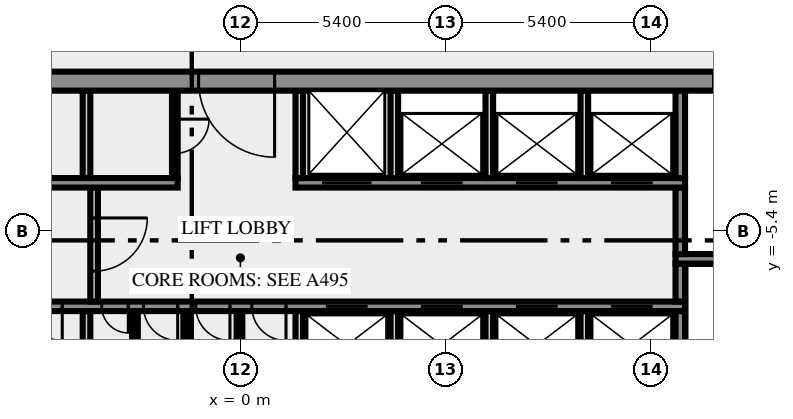
"""IFC4 building model, lengths in metres.
Left out: names, types, materials, properties, quantities, classifications, styles, units other than length and angle.
Written with IfcOpenShell. Run it as: python <this file> out.ifc"""

import sys

from ifc_helpers import new_model, si_unit, direction, frame, frame_2d, origin, place, context, subcontext, project, spatial, rectangle, extrude, element, fill, save


model = new_model("IFC4")
c1 = context("Model", 3, precision=1e-05, world=origin(), true_north=direction((0.0, 1.0)))
c2 = subcontext(c1, "Body", "Model", "MODEL_VIEW")
j1 = project(units=[si_unit("LENGTHUNIT", "METRE"), si_unit("PLANEANGLEUNIT", "RADIAN")], contexts=[c1])
p1 = place(None, origin())
s1 = spatial("IfcSite", under=j1, at=p1, CompositionType="ELEMENT")
p2 = place(p1, origin())
s2 = spatial("IfcBuilding", under=s1, at=p2, CompositionType="ELEMENT")
p3 = place(p2, frame((0.0, 0.0, 214.0)))
s3 = spatial("IfcBuildingStorey", under=s2, at=p3, CompositionType="ELEMENT", Elevation=214.0)
p4 = place(p3, frame((-4.05, -10.5, 0.0), z_axis=(0.0, 0.0, 1.0), x_axis=(0.0, 1.0, 0.0)))
e1 = element("IfcWall", 1, at=p4, inside=s3, PredefinedType="SOLIDWALL", context=c2, shape_type="SweptSolid", body=[
    extrude(rectangle(XDim=3.0, YDim=0.2, at=frame_2d((1.5, 0.0))), origin(), (0.0, 0.0, 1.0), 3.65),
])
for number, where, z_axis, x_axis in (
    (2, (-2.775, -10.5, 0.0), (0.0, 0.0, 1.0), (0.0, 1.0, 0.0)),
    (3, (-1.425, -10.5, 0.0), (0.0, 0.0, 1.0), (0.0, 1.0, 0.0)),
    (4, (-0.025, -10.5, 0.0), (0.0, 0.0, 1.0), (0.0, 1.0, 0.0)),
):
    element("IfcWall", number, at=place(p3, frame(where, z_axis=z_axis, x_axis=x_axis)), inside=s3, PredefinedType="PARTITIONING", context=c2, shape_type="SweptSolid", body=[
        extrude(rectangle(XDim=3.0, YDim=0.15, at=frame_2d((1.5, 0.0))), origin(), (0.0, 0.0, 1.0), 3.65),
    ])
for number, where, z_axis, x_axis in (
    (5, (1.55, -10.5, 0.0), (0.0, 0.0, 1.0), (0.0, 1.0, 0.0)),
    (6, (4.05, -10.5, 0.0), (0.0, 0.0, 1.0), (0.0, 1.0, 0.0)),
    (7, (6.55, -10.5, 0.0), (0.0, 0.0, 1.0), (0.0, 1.0, 0.0)),
    (8, (9.05, -10.5, 0.0), (0.0, 0.0, 1.0), (0.0, 1.0, 0.0)),
):
    element("IfcWall", number, at=place(p3, frame(where, z_axis=z_axis, x_axis=x_axis)), inside=s3, PredefinedType="SOLIDWALL", context=c2, shape_type="SweptSolid", body=[
        extrude(rectangle(XDim=3.0, YDim=0.2, at=frame_2d((1.5, 0.0))), origin(), (0.0, 0.0, 1.0), 3.65),
    ])
p5 = place(p3, frame((11.575, -10.5, 0.0), z_axis=(0.0, 0.0, 1.0), x_axis=(0.0, 1.0, 0.0)))
e9 = element("IfcWall", 9, at=p5, inside=s3, PredefinedType="SHEAR", context=c2, shape_type="SweptSolid", body=[
    extrude(rectangle(XDim=3.0, YDim=0.25, at=frame_2d((1.5, 0.0))), origin(), (0.0, 0.0, 1.0), 3.65),
])
p6 = place(p3, frame((11.7, -7.375, 0.0), z_axis=(0.0, 0.0, 1.0), x_axis=(-1.0, 0.0, 0.0)))
e10 = element("IfcWall", 10, at=p6, inside=s3, PredefinedType="SHEAR", context=c2, shape_type="SweptSolid", body=[
    extrude(rectangle(XDim=23.4, YDim=0.25, at=frame_2d((11.7, 0.0))), origin(), (0.0, 0.0, 1.0), 3.65),
])
p7 = place(p6, frame((21.312, 0.0, 0.0)))
e11 = element("IfcOpeningElement", 11, at=p7, cuts=e10, PredefinedType="OPENING", context=c2, shape_type="SweptSolid", body=[
    extrude(rectangle(XDim=0.9, YDim=2.1, at=frame_2d((0.45, 1.05))), frame((0.0, 0.135, 0.0), z_axis=(0.0, -1.0, 0.0), x_axis=(1.0, 0.0, 0.0)), (0.0, 0.0, 1.0), 0.27),
])
p8 = place(p6, frame((18.65, 0.0, 0.0)))
e12 = element("IfcOpeningElement", 12, at=p8, cuts=e10, PredefinedType="OPENING", context=c2, shape_type="SweptSolid", body=[
    extrude(rectangle(XDim=0.9, YDim=2.1, at=frame_2d((0.45, 1.05))), frame((0.0, 0.135, 0.0), z_axis=(0.0, -1.0, 0.0), x_axis=(1.0, 0.0, 0.0)), (0.0, 0.0, 1.0), 0.27),
])
p9 = place(p6, frame((16.388, 0.0, 0.0)))
e13 = element("IfcOpeningElement", 13, at=p9, cuts=e10, PredefinedType="OPENING", context=c2, shape_type="SweptSolid", body=[
    extrude(rectangle(XDim=0.9, YDim=2.1, at=frame_2d((0.45, 1.05))), frame((0.0, 0.135, 0.0), z_axis=(0.0, -1.0, 0.0), x_axis=(1.0, 0.0, 0.0)), (0.0, 0.0, 1.0), 0.27),
])
p10 = place(p6, frame((14.65, 0.0, 0.0)))
e14 = element("IfcOpeningElement", 14, at=p10, cuts=e10, PredefinedType="OPENING", context=c2, shape_type="SweptSolid", body=[
    extrude(rectangle(XDim=0.7, YDim=2.1, at=frame_2d((0.35, 1.05))), frame((0.0, 0.135, 0.0), z_axis=(0.0, -1.0, 0.0), x_axis=(1.0, 0.0, 0.0)), (0.0, 0.0, 1.0), 0.27),
])
p11 = place(p6, frame((13.35, 0.0, 0.0)))
e15 = element("IfcOpeningElement", 15, at=p11, cuts=e10, PredefinedType="OPENING", context=c2, shape_type="SweptSolid", body=[
    extrude(rectangle(XDim=0.9, YDim=2.1, at=frame_2d((0.45, 1.05))), frame((0.0, 0.135, 0.0), z_axis=(0.0, -1.0, 0.0), x_axis=(1.0, 0.0, 0.0)), (0.0, 0.0, 1.0), 0.27),
])
p12 = place(p6, frame((11.975, 0.0, 0.0)))
e16 = element("IfcOpeningElement", 16, at=p12, cuts=e10, PredefinedType="OPENING", context=c2, shape_type="SweptSolid", body=[
    extrude(rectangle(XDim=0.9, YDim=2.1, at=frame_2d((0.45, 1.05))), frame((0.0, 0.135, 0.0), z_axis=(0.0, -1.0, 0.0), x_axis=(1.0, 0.0, 0.0)), (0.0, 0.0, 1.0), 0.27),
])
p13 = place(p6, frame((10.5, 0.0, 0.0)))
e17 = element("IfcOpeningElement", 17, at=p13, cuts=e10, PredefinedType="OPENING", context=c2, shape_type="SweptSolid", body=[
    extrude(rectangle(XDim=0.9, YDim=2.1, at=frame_2d((0.45, 1.05))), frame((0.0, 0.135, 0.0), z_axis=(0.0, -1.0, 0.0), x_axis=(1.0, 0.0, 0.0)), (0.0, 0.0, 1.0), 0.27),
])
p14 = place(p6, frame((8.35, 0.0, 0.0)))
e18 = element("IfcOpeningElement", 18, at=p14, cuts=e10, PredefinedType="OPENING", context=c2, shape_type="SweptSolid", body=[
    extrude(rectangle(XDim=1.1, YDim=2.1, at=frame_2d((0.55, 1.05))), frame((0.0, 0.135, 0.0), z_axis=(0.0, -1.0, 0.0), x_axis=(1.0, 0.0, 0.0)), (0.0, 0.0, 1.0), 0.27),
])
p15 = place(p6, frame((5.85, 0.0, 0.0)))
e19 = element("IfcOpeningElement", 19, at=p15, cuts=e10, PredefinedType="OPENING", context=c2, shape_type="SweptSolid", body=[
    extrude(rectangle(XDim=1.1, YDim=2.1, at=frame_2d((0.55, 1.05))), frame((0.0, 0.135, 0.0), z_axis=(0.0, -1.0, 0.0), x_axis=(1.0, 0.0, 0.0)), (0.0, 0.0, 1.0), 0.27),
])
p16 = place(p6, frame((3.35, 0.0, 0.0)))
e20 = element("IfcOpeningElement", 20, at=p16, cuts=e10, PredefinedType="OPENING", context=c2, shape_type="SweptSolid", body=[
    extrude(rectangle(XDim=1.1, YDim=2.1, at=frame_2d((0.55, 1.05))), frame((0.0, 0.135, 0.0), z_axis=(0.0, -1.0, 0.0), x_axis=(1.0, 0.0, 0.0)), (0.0, 0.0, 1.0), 0.27),
])
p17 = place(p6, frame((0.85, 0.0, 0.0)))
e21 = element("IfcOpeningElement", 21, at=p17, cuts=e10, PredefinedType="OPENING", context=c2, shape_type="SweptSolid", body=[
    extrude(rectangle(XDim=1.1, YDim=2.1, at=frame_2d((0.55, 1.05))), frame((0.0, 0.135, 0.0), z_axis=(0.0, -1.0, 0.0), x_axis=(1.0, 0.0, 0.0)), (0.0, 0.0, 1.0), 0.27),
])
p18 = place(p3, frame((-3.85, -4.25, 0.0), z_axis=(0.0, 0.0, 1.0), x_axis=(0.0, -1.0, 0.0)))
e22 = element("IfcWall", 22, at=p18, inside=s3, PredefinedType="SOLIDWALL", context=c2, shape_type="SweptSolid", body=[
    extrude(rectangle(XDim=3.0, YDim=0.2, at=frame_2d((1.5, 0.0))), origin(), (0.0, 0.0, 1.0), 3.65),
])
p19 = place(p18, frame((0.8, 0.0, 0.0)))
e23 = element("IfcOpeningElement", 23, at=p19, cuts=e22, PredefinedType="OPENING", context=c2, shape_type="SweptSolid", body=[
    extrude(rectangle(XDim=1.4, YDim=2.1, at=frame_2d((0.7, 1.05))), frame((0.0, 0.11, 0.0), z_axis=(0.0, -1.0, 0.0), x_axis=(1.0, 0.0, 0.0)), (0.0, 0.0, 1.0), 0.22),
])
p20 = place(p3, frame((11.575, -7.25, 0.0), z_axis=(0.0, 0.0, 1.0), x_axis=(0.0, 1.0, 0.0)))
e24 = element("IfcWall", 24, at=p20, inside=s3, PredefinedType="SHEAR", context=c2, shape_type="SweptSolid", body=[
    extrude(rectangle(XDim=1.0, YDim=0.25, at=frame_2d((0.5, 0.0))), origin(), (0.0, 0.0, 1.0), 3.65),
])
p21 = place(p3, frame((19.5, -6.125, 0.0), z_axis=(0.0, 0.0, 1.0), x_axis=(-1.0, 0.0, 0.0)))
e25 = element("IfcWall", 25, at=p21, inside=s3, PredefinedType="SHEAR", context=c2, shape_type="SweptSolid", body=[
    extrude(rectangle(XDim=8.05, YDim=0.25, at=frame_2d((4.025, 0.0))), origin(), (0.0, 0.0, 1.0), 3.65),
])
p22 = place(p21, frame((0.05, 0.0, 0.0)))
e26 = element("IfcOpeningElement", 26, at=p22, cuts=e25, PredefinedType="OPENING", context=c2, shape_type="SweptSolid", body=[
    extrude(rectangle(XDim=1.8, YDim=2.1, at=frame_2d((0.9, 1.05))), frame((0.0, 0.135, 0.0), z_axis=(0.0, -1.0, 0.0), x_axis=(1.0, 0.0, 0.0)), (0.0, 0.0, 1.0), 0.27),
])
p23 = place(p3, frame((11.575, -6.0, 0.0), z_axis=(0.0, 0.0, 1.0), x_axis=(0.0, 1.0, 0.0)))
e27 = element("IfcWall", 27, at=p23, inside=s3, PredefinedType="SHEAR", context=c2, shape_type="SweptSolid", body=[
    extrude(rectangle(XDim=1.75, YDim=0.25, at=frame_2d((0.875, 0.0))), origin(), (0.0, 0.0, 1.0), 3.65),
])
p24 = place(p3, frame((-11.7, -4.125, 0.0), z_axis=(0.0, 0.0, 1.0), x_axis=(1.0, 0.0, 0.0)))
e28 = element("IfcWall", 28, at=p24, inside=s3, PredefinedType="SHEAR", context=c2, shape_type="SweptSolid", body=[
    extrude(rectangle(XDim=10.05, YDim=0.25, at=frame_2d((5.025, 0.0))), origin(), (0.0, 0.0, 1.0), 3.65),
])
p25 = place(p3, frame((1.45, -4.125, 0.0), z_axis=(0.0, 0.0, 1.0), x_axis=(1.0, 0.0, 0.0)))
e29 = element("IfcWall", 29, at=p25, inside=s3, PredefinedType="SHEAR", context=c2, shape_type="SweptSolid", body=[
    extrude(rectangle(XDim=10.25, YDim=0.25, at=frame_2d((5.125, 0.0))), origin(), (0.0, 0.0, 1.0), 3.65),
])
p26 = place(p25, frame((0.7, 0.0, 0.0)))
e30 = element("IfcOpeningElement", 30, at=p26, cuts=e29, PredefinedType="OPENING", context=c2, shape_type="SweptSolid", body=[
    extrude(rectangle(XDim=1.3, YDim=2.1, at=frame_2d((0.65, 1.05))), frame((0.0, 0.135, 0.0), z_axis=(0.0, -1.0, 0.0), x_axis=(1.0, 0.0, 0.0)), (0.0, 0.0, 1.0), 0.27),
])
p27 = place(p25, frame((3.3, 0.0, 0.0)))
e31 = element("IfcOpeningElement", 31, at=p27, cuts=e29, PredefinedType="OPENING", context=c2, shape_type="SweptSolid", body=[
    extrude(rectangle(XDim=1.1, YDim=2.1, at=frame_2d((0.55, 1.05))), frame((0.0, 0.135, 0.0), z_axis=(0.0, -1.0, 0.0), x_axis=(1.0, 0.0, 0.0)), (0.0, 0.0, 1.0), 0.27),
])
p28 = place(p25, frame((5.8, 0.0, 0.0)))
e32 = element("IfcOpeningElement", 32, at=p28, cuts=e29, PredefinedType="OPENING", context=c2, shape_type="SweptSolid", body=[
    extrude(rectangle(XDim=1.1, YDim=2.1, at=frame_2d((0.55, 1.05))), frame((0.0, 0.135, 0.0), z_axis=(0.0, -1.0, 0.0), x_axis=(1.0, 0.0, 0.0)), (0.0, 0.0, 1.0), 0.27),
])
p29 = place(p25, frame((8.3, 0.0, 0.0)))
e33 = element("IfcOpeningElement", 33, at=p29, cuts=e29, PredefinedType="OPENING", context=c2, shape_type="SweptSolid", body=[
    extrude(rectangle(XDim=1.1, YDim=2.1, at=frame_2d((0.55, 1.05))), frame((0.0, 0.135, 0.0), z_axis=(0.0, -1.0, 0.0), x_axis=(1.0, 0.0, 0.0)), (0.0, 0.0, 1.0), 0.27),
])
p30 = place(p3, frame((-4.05, -4.0, 0.0), z_axis=(0.0, 0.0, 1.0), x_axis=(0.0, 1.0, 0.0)))
e34 = element("IfcWall", 34, at=p30, inside=s3, PredefinedType="SOLIDWALL", context=c2, shape_type="SweptSolid", body=[
    extrude(rectangle(XDim=2.3, YDim=0.2, at=frame_2d((1.15, 0.0))), origin(), (0.0, 0.0, 1.0), 3.65),
])
p31 = place(p3, frame((-1.725, -1.7, 0.0), z_axis=(0.0, 0.0, 1.0), x_axis=(0.0, -1.0, 0.0)))
e35 = element("IfcWall", 35, at=p31, inside=s3, PredefinedType="PARTITIONING", context=c2, shape_type="SweptSolid", body=[
    extrude(rectangle(XDim=2.3, YDim=0.15, at=frame_2d((1.15, 0.0))), origin(), (0.0, 0.0, 1.0), 3.65),
])
p32 = place(p31, frame((0.75, 0.0, 0.0)))
e36 = element("IfcOpeningElement", 36, at=p32, cuts=e35, PredefinedType="OPENING", context=c2, shape_type="SweptSolid", body=[
    extrude(rectangle(XDim=0.9, YDim=2.1, at=frame_2d((0.45, 1.05))), frame((0.0, 0.085, 0.0), z_axis=(0.0, -1.0, 0.0), x_axis=(1.0, 0.0, 0.0)), (0.0, 0.0, 1.0), 0.17),
])
for number, where, z_axis, x_axis in (
    (37, (1.55, -4.0, 0.0), (0.0, 0.0, 1.0), (0.0, 1.0, 0.0)),
    (38, (4.05, -4.0, 0.0), (0.0, 0.0, 1.0), (0.0, 1.0, 0.0)),
    (39, (6.55, -4.0, 0.0), (0.0, 0.0, 1.0), (0.0, 1.0, 0.0)),
    (40, (9.05, -4.0, 0.0), (0.0, 0.0, 1.0), (0.0, 1.0, 0.0)),
):
    element("IfcWall", number, at=place(p3, frame(where, z_axis=z_axis, x_axis=x_axis)), inside=s3, PredefinedType="SOLIDWALL", context=c2, shape_type="SweptSolid", body=[
        extrude(rectangle(XDim=2.3, YDim=0.2, at=frame_2d((1.15, 0.0))), origin(), (0.0, 0.0, 1.0), 3.65),
    ])
p33 = place(p3, frame((11.575, -4.0, 0.0), z_axis=(0.0, 0.0, 1.0), x_axis=(0.0, 1.0, 0.0)))
e41 = element("IfcWall", 41, at=p33, inside=s3, PredefinedType="SHEAR", context=c2, shape_type="SweptSolid", body=[
    extrude(rectangle(XDim=2.3, YDim=0.25, at=frame_2d((1.15, 0.0))), origin(), (0.0, 0.0, 1.0), 3.65),
])
p34 = place(p3, frame((20.49, -1.45, 0.0), z_axis=(0.0, 0.0, 1.0), x_axis=(-1.0, 0.0, 0.0)))
e42 = element("IfcWall", 42, at=p34, inside=s3, PredefinedType="SHEAR", context=c2, shape_type="SweptSolid", body=[
    extrude(rectangle(XDim=40.98, YDim=0.5, at=frame_2d((20.49, 0.0))), origin(), (0.0, 0.0, 1.0), 3.65),
])
p35 = place(p34, frame((38.14, 0.0, 0.0)))
e43 = element("IfcOpeningElement", 43, at=p35, cuts=e42, PredefinedType="OPENING", context=c2, shape_type="SweptSolid", body=[
    extrude(rectangle(XDim=1.8, YDim=2.1, at=frame_2d((0.9, 1.05))), frame((0.0, 0.26, 0.0), z_axis=(0.0, -1.0, 0.0), x_axis=(1.0, 0.0, 0.0)), (0.0, 0.0, 1.0), 0.52),
])
p36 = place(p34, frame((36.728, 0.0, 0.0)))
e44 = element("IfcOpeningElement", 44, at=p36, cuts=e42, PredefinedType="OPENING", context=c2, shape_type="SweptSolid", body=[
    extrude(rectangle(XDim=0.8, YDim=2.1, at=frame_2d((0.4, 1.05))), frame((0.0, 0.26, 0.0), z_axis=(0.0, -1.0, 0.0), x_axis=(1.0, 0.0, 0.0)), (0.0, 0.0, 1.0), 0.52),
])
p37 = place(p34, frame((35.153, 0.0, 0.0)))
e45 = element("IfcOpeningElement", 45, at=p37, cuts=e42, PredefinedType="OPENING", context=c2, shape_type="SweptSolid", body=[
    extrude(rectangle(XDim=0.8, YDim=2.1, at=frame_2d((0.4, 1.05))), frame((0.0, 0.26, 0.0), z_axis=(0.0, -1.0, 0.0), x_axis=(1.0, 0.0, 0.0)), (0.0, 0.0, 1.0), 0.52),
])
p38 = place(p34, frame((32.94, 0.0, 0.0)))
e46 = element("IfcOpeningElement", 46, at=p38, cuts=e42, PredefinedType="OPENING", context=c2, shape_type="SweptSolid", body=[
    extrude(rectangle(XDim=0.9, YDim=2.1, at=frame_2d((0.45, 1.05))), frame((0.0, 0.26, 0.0), z_axis=(0.0, -1.0, 0.0), x_axis=(1.0, 0.0, 0.0)), (0.0, 0.0, 1.0), 0.52),
])
p39 = place(p34, frame((30.702, 0.0, 0.0)))
e47 = element("IfcOpeningElement", 47, at=p39, cuts=e42, PredefinedType="OPENING", context=c2, shape_type="SweptSolid", body=[
    extrude(rectangle(XDim=0.9, YDim=2.1, at=frame_2d((0.45, 1.05))), frame((0.0, 0.26, 0.0), z_axis=(0.0, -1.0, 0.0), x_axis=(1.0, 0.0, 0.0)), (0.0, 0.0, 1.0), 0.52),
])
p40 = place(p34, frame((28.64, 0.0, 0.0)))
e48 = element("IfcOpeningElement", 48, at=p40, cuts=e42, PredefinedType="OPENING", context=c2, shape_type="SweptSolid", body=[
    extrude(rectangle(XDim=0.9, YDim=2.1, at=frame_2d((0.45, 1.05))), frame((0.0, 0.26, 0.0), z_axis=(0.0, -1.0, 0.0), x_axis=(1.0, 0.0, 0.0)), (0.0, 0.0, 1.0), 0.52),
])
p41 = place(p34, frame((25.778, 0.0, 0.0)))
e49 = element("IfcOpeningElement", 49, at=p41, cuts=e42, PredefinedType="OPENING", context=c2, shape_type="SweptSolid", body=[
    extrude(rectangle(XDim=0.9, YDim=2.1, at=frame_2d((0.45, 1.05))), frame((0.0, 0.26, 0.0), z_axis=(0.0, -1.0, 0.0), x_axis=(1.0, 0.0, 0.0)), (0.0, 0.0, 1.0), 0.52),
])
p42 = place(p34, frame((19.59, 0.0, 0.0)))
e50 = element("IfcOpeningElement", 50, at=p42, cuts=e42, PredefinedType="OPENING", context=c2, shape_type="SweptSolid", body=[
    extrude(rectangle(XDim=2.0, YDim=2.1, at=frame_2d((1.0, 1.05))), frame((0.0, 0.26, 0.0), z_axis=(0.0, -1.0, 0.0), x_axis=(1.0, 0.0, 0.0)), (0.0, 0.0, 1.0), 0.52),
])
p43 = place(p34, frame((7.14, 0.0, 0.0)))
e51 = element("IfcOpeningElement", 51, at=p43, cuts=e42, PredefinedType="OPENING", context=c2, shape_type="SweptSolid", body=[
    extrude(rectangle(XDim=0.9, YDim=2.1, at=frame_2d((0.45, 1.05))), frame((0.0, 0.26, 0.0), z_axis=(0.0, -1.0, 0.0), x_axis=(1.0, 0.0, 0.0)), (0.0, 0.0, 1.0), 0.52),
])
p44 = place(p34, frame((4.19, 0.0, 0.0)))
e52 = element("IfcOpeningElement", 52, at=p44, cuts=e42, PredefinedType="OPENING", context=c2, shape_type="SweptSolid", body=[
    extrude(rectangle(XDim=0.9, YDim=2.1, at=frame_2d((0.45, 1.05))), frame((0.0, 0.26, 0.0), z_axis=(0.0, -1.0, 0.0), x_axis=(1.0, 0.0, 0.0)), (0.0, 0.0, 1.0), 0.52),
])
p45 = place(p34, frame((1.04, 0.0, 0.0)))
e53 = element("IfcOpeningElement", 53, at=p45, cuts=e42, PredefinedType="OPENING", context=c2, shape_type="SweptSolid", body=[
    extrude(rectangle(XDim=1.8, YDim=2.1, at=frame_2d((0.9, 1.05))), frame((0.0, 0.26, 0.0), z_axis=(0.0, -1.0, 0.0), x_axis=(1.0, 0.0, 0.0)), (0.0, 0.0, 1.0), 0.52),
])
p46 = place(p9, origin())
e54 = element("IfcDoor", 54, at=p46, inside=s3, OperationType="SINGLE_SWING_RIGHT", PredefinedType="DOOR", context=c2, shape_type="SweptSolid", body=[
    extrude(rectangle(XDim=0.9, YDim=2.1, at=frame_2d((0.45, 1.05))), frame((0.0, 0.025, 0.0), z_axis=(0.0, -1.0, 0.0), x_axis=(1.0, 0.0, 0.0)), (0.0, 0.0, 1.0), 0.05),
])
fill(e13, e54)
p47 = place(p10, origin())
e55 = element("IfcDoor", 55, at=p47, inside=s3, OperationType="SINGLE_SWING_RIGHT", PredefinedType="DOOR", context=c2, shape_type="SweptSolid", body=[
    extrude(rectangle(XDim=0.7, YDim=2.1, at=frame_2d((0.35, 1.05))), frame((0.0, 0.025, 0.0), z_axis=(0.0, -1.0, 0.0), x_axis=(1.0, 0.0, 0.0)), (0.0, 0.0, 1.0), 0.05),
])
fill(e14, e55)
p48 = place(p11, origin())
e56 = element("IfcDoor", 56, at=p48, inside=s3, OperationType="SINGLE_SWING_RIGHT", PredefinedType="DOOR", context=c2, shape_type="SweptSolid", body=[
    extrude(rectangle(XDim=0.9, YDim=2.1, at=frame_2d((0.45, 1.05))), frame((0.0, 0.025, 0.0), z_axis=(0.0, -1.0, 0.0), x_axis=(1.0, 0.0, 0.0)), (0.0, 0.0, 1.0), 0.05),
])
fill(e15, e56)
p49 = place(p12, origin())
e57 = element("IfcDoor", 57, at=p49, inside=s3, OperationType="SINGLE_SWING_RIGHT", PredefinedType="DOOR", context=c2, shape_type="SweptSolid", body=[
    extrude(rectangle(XDim=0.9, YDim=2.1, at=frame_2d((0.45, 1.05))), frame((0.0, 0.025, 0.0), z_axis=(0.0, -1.0, 0.0), x_axis=(1.0, 0.0, 0.0)), (0.0, 0.0, 1.0), 0.05),
])
fill(e16, e57)
p50 = place(p13, origin())
e58 = element("IfcDoor", 58, at=p50, inside=s3, OperationType="SINGLE_SWING_LEFT", PredefinedType="DOOR", context=c2, shape_type="SweptSolid", body=[
    extrude(rectangle(XDim=0.9, YDim=2.1, at=frame_2d((0.45, 1.05))), frame((0.0, 0.025, 0.0), z_axis=(0.0, -1.0, 0.0), x_axis=(1.0, 0.0, 0.0)), (0.0, 0.0, 1.0), 0.05),
])
fill(e17, e58)
p51 = place(p14, origin())
e59 = element("IfcDoor", 59, at=p51, inside=s3, OperationType="DOUBLE_DOOR_SLIDING", PredefinedType="DOOR", context=c2, shape_type="SweptSolid", body=[
    extrude(rectangle(XDim=1.1, YDim=2.1, at=frame_2d((0.55, 1.05))), frame((0.0, 0.025, 0.0), z_axis=(0.0, -1.0, 0.0), x_axis=(1.0, 0.0, 0.0)), (0.0, 0.0, 1.0), 0.05),
])
fill(e18, e59)
p52 = place(p15, origin())
e60 = element("IfcDoor", 60, at=p52, inside=s3, OperationType="DOUBLE_DOOR_SLIDING", PredefinedType="DOOR", context=c2, shape_type="SweptSolid", body=[
    extrude(rectangle(XDim=1.1, YDim=2.1, at=frame_2d((0.55, 1.05))), frame((0.0, 0.025, 0.0), z_axis=(0.0, -1.0, 0.0), x_axis=(1.0, 0.0, 0.0)), (0.0, 0.0, 1.0), 0.05),
])
fill(e19, e60)
p53 = place(p16, origin())
e61 = element("IfcDoor", 61, at=p53, inside=s3, OperationType="DOUBLE_DOOR_SLIDING", PredefinedType="DOOR", context=c2, shape_type="SweptSolid", body=[
    extrude(rectangle(XDim=1.1, YDim=2.1, at=frame_2d((0.55, 1.05))), frame((0.0, 0.025, 0.0), z_axis=(0.0, -1.0, 0.0), x_axis=(1.0, 0.0, 0.0)), (0.0, 0.0, 1.0), 0.05),
])
fill(e20, e61)
p54 = place(p17, origin())
e62 = element("IfcDoor", 62, at=p54, inside=s3, OperationType="DOUBLE_DOOR_SLIDING", PredefinedType="DOOR", context=c2, shape_type="SweptSolid", body=[
    extrude(rectangle(XDim=1.1, YDim=2.1, at=frame_2d((0.55, 1.05))), frame((0.0, 0.025, 0.0), z_axis=(0.0, -1.0, 0.0), x_axis=(1.0, 0.0, 0.0)), (0.0, 0.0, 1.0), 0.05),
])
fill(e21, e62)
p55 = place(p19, origin())
e63 = element("IfcDoor", 63, at=p55, inside=s3, OperationType="DOUBLE_DOOR_SINGLE_SWING", PredefinedType="DOOR", context=c2, shape_type="SweptSolid", body=[
    extrude(rectangle(XDim=1.4, YDim=2.1, at=frame_2d((0.7, 1.05))), frame((0.0, 0.025, 0.0), z_axis=(0.0, -1.0, 0.0), x_axis=(1.0, 0.0, 0.0)), (0.0, 0.0, 1.0), 0.05),
])
fill(e23, e63)
p56 = place(p26, origin())
e64 = element("IfcDoor", 64, at=p56, inside=s3, OperationType="DOUBLE_DOOR_SLIDING", PredefinedType="DOOR", context=c2, shape_type="SweptSolid", body=[
    extrude(rectangle(XDim=1.3, YDim=2.1, at=frame_2d((0.65, 1.05))), frame((0.0, 0.025, 0.0), z_axis=(0.0, -1.0, 0.0), x_axis=(1.0, 0.0, 0.0)), (0.0, 0.0, 1.0), 0.05),
])
fill(e30, e64)
p57 = place(p27, origin())
e65 = element("IfcDoor", 65, at=p57, inside=s3, OperationType="DOUBLE_DOOR_SLIDING", PredefinedType="DOOR", context=c2, shape_type="SweptSolid", body=[
    extrude(rectangle(XDim=1.1, YDim=2.1, at=frame_2d((0.55, 1.05))), frame((0.0, 0.025, 0.0), z_axis=(0.0, -1.0, 0.0), x_axis=(1.0, 0.0, 0.0)), (0.0, 0.0, 1.0), 0.05),
])
fill(e31, e65)
p58 = place(p28, origin())
e66 = element("IfcDoor", 66, at=p58, inside=s3, OperationType="DOUBLE_DOOR_SLIDING", PredefinedType="DOOR", context=c2, shape_type="SweptSolid", body=[
    extrude(rectangle(XDim=1.1, YDim=2.1, at=frame_2d((0.55, 1.05))), frame((0.0, 0.025, 0.0), z_axis=(0.0, -1.0, 0.0), x_axis=(1.0, 0.0, 0.0)), (0.0, 0.0, 1.0), 0.05),
])
fill(e32, e66)
p59 = place(p29, origin())
e67 = element("IfcDoor", 67, at=p59, inside=s3, OperationType="DOUBLE_DOOR_SLIDING", PredefinedType="DOOR", context=c2, shape_type="SweptSolid", body=[
    extrude(rectangle(XDim=1.1, YDim=2.1, at=frame_2d((0.55, 1.05))), frame((0.0, 0.025, 0.0), z_axis=(0.0, -1.0, 0.0), x_axis=(1.0, 0.0, 0.0)), (0.0, 0.0, 1.0), 0.05),
])
fill(e33, e67)
p60 = place(p32, origin())
e68 = element("IfcDoor", 68, at=p60, inside=s3, OperationType="SINGLE_SWING_RIGHT", PredefinedType="DOOR", context=c2, shape_type="SweptSolid", body=[
    extrude(rectangle(XDim=0.9, YDim=2.1, at=frame_2d((0.45, 1.05))), frame((0.0, 0.025, 0.0), z_axis=(0.0, -1.0, 0.0), x_axis=(1.0, 0.0, 0.0)), (0.0, 0.0, 1.0), 0.05),
])
fill(e36, e68)
p61 = place(p42, origin())
e69 = element("IfcDoor", 69, at=p61, inside=s3, OperationType="DOUBLE_DOOR_SINGLE_SWING", PredefinedType="DOOR", context=c2, shape_type="SweptSolid", body=[
    extrude(rectangle(XDim=2.0, YDim=2.1, at=frame_2d((1.0, 1.05))), frame((0.0, 0.025, 0.0), z_axis=(0.0, -1.0, 0.0), x_axis=(1.0, 0.0, 0.0)), (0.0, 0.0, 1.0), 0.05),
])
fill(e50, e69)
save(model, sys.argv[1])
